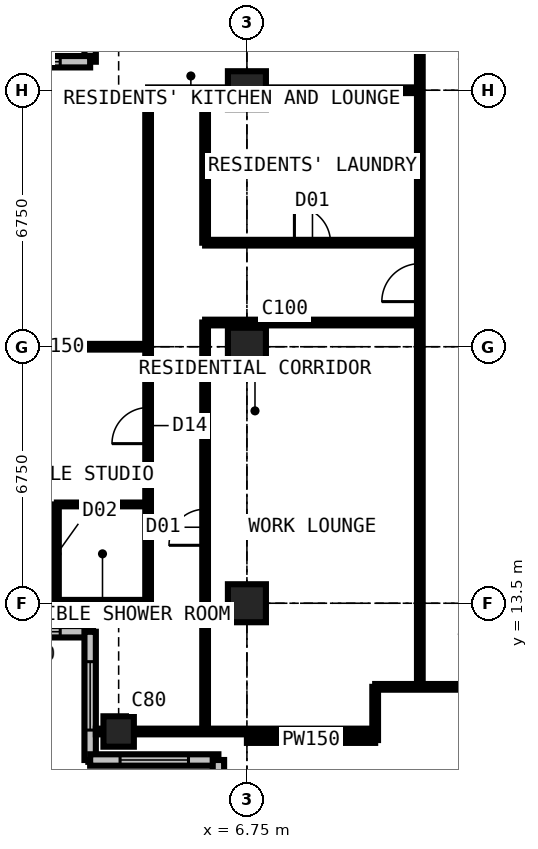
"""IFC4 building model, lengths in metres.
Left out: names, types, materials, properties, quantities, classifications, styles, units other than length and angle.
Written with IfcOpenShell. Run it as: python <this file> out.ifc"""

import sys

from ifc_helpers import new_model, si_unit, direction, frame, frame_2d, origin, origin_2d, place, context, subcontext, project, spatial, rectangle, extrude, element, fill, save


model = new_model("IFC4")
c1 = context("Model", 3, precision=1e-05, world=origin(), true_north=direction((0.0, 1.0)))
c2 = subcontext(c1, "Body", "Model", "MODEL_VIEW")
j1 = project(units=[si_unit("LENGTHUNIT", "METRE"), si_unit("PLANEANGLEUNIT", "RADIAN")], contexts=[c1])
p1 = place(None, origin())
s1 = spatial("IfcSite", under=j1, at=p1, CompositionType="ELEMENT")
p2 = place(p1, origin())
s2 = spatial("IfcBuilding", under=s1, at=p2, CompositionType="ELEMENT")
p3 = place(p2, frame((0.0, 0.0, 233.1)))
s3 = spatial("IfcBuildingStorey", under=s2, at=p3, CompositionType="ELEMENT", Elevation=233.1)
p4 = place(p3, frame((3.375, 10.125, 0.0), z_axis=(0.0, 0.0, 1.0), x_axis=(1.0, 0.0, 0.0)))
e1 = element("IfcColumn", 1, at=p4, inside=s3, PredefinedType="COLUMN", context=c2, shape_type="SweptSolid", body=[
    extrude(rectangle(XDim=0.8, YDim=0.8, at=origin_2d()), origin(), (0.0, 0.0, 1.0), 3.6),
])
for number, where, z_axis, x_axis in (
    (2, (6.75, 13.5, 0.0), (0.0, 0.0, 1.0), (1.0, 0.0, 0.0)),
    (3, (6.75, 20.25, 0.0), (0.0, 0.0, 1.0), (1.0, 0.0, 0.0)),
    (4, (6.75, 27.0, 0.0), (0.0, 0.0, 1.0), (1.0, 0.0, 0.0)),
):
    element("IfcColumn", number, at=place(p3, frame(where, z_axis=z_axis, x_axis=x_axis)), inside=s3, PredefinedType="COLUMN", context=c2, shape_type="SweptSolid", body=[
        extrude(rectangle(XDim=1.0, YDim=1.0, at=origin_2d()), origin(), (0.0, 0.0, 1.0), 3.6),
    ])
p5 = place(p3, frame((2.625, 31.125, 0.0), z_axis=(0.0, 0.0, 1.0), x_axis=(0.0, -1.0, 0.0)))
e5 = element("IfcWall", 5, at=p5, inside=s3, PredefinedType="SOLIDWALL", context=c2, shape_type="SweptSolid", body=[
    extrude(rectangle(XDim=3.375, YDim=0.3, at=frame_2d((1.688, 0.0))), origin(), (0.0, 0.0, 1.0), 3.375),
])
p6 = place(p5, frame((0.788, 0.0, 0.6)))
e6 = element("IfcOpeningElement", 6, at=p6, cuts=e5, PredefinedType="OPENING", context=c2, shape_type="SweptSolid", body=[
    extrude(rectangle(XDim=1.8, YDim=2.1, at=frame_2d((0.9, 1.05))), frame((0.0, 0.16, 0.0), z_axis=(0.0, -1.0, 0.0), x_axis=(1.0, 0.0, 0.0)), (0.0, 0.0, 1.0), 0.32),
])
p7 = place(p3, frame((2.625, 27.75, 0.0), z_axis=(0.0, 0.0, 1.0), x_axis=(-1.0, 0.0, 0.0)))
e7 = element("IfcWall", 7, at=p7, inside=s3, PredefinedType="SOLIDWALL", context=c2, shape_type="SweptSolid", body=[
    extrude(rectangle(XDim=3.375, YDim=0.3, at=frame_2d((1.688, 0.0))), origin(), (0.0, 0.0, 1.0), 3.375),
])
p8 = place(p7, frame((0.788, 0.0, 0.6)))
e8 = element("IfcOpeningElement", 8, at=p8, cuts=e7, PredefinedType="OPENING", context=c2, shape_type="SweptSolid", body=[
    extrude(rectangle(XDim=1.8, YDim=2.1, at=frame_2d((0.9, 1.05))), frame((0.0, 0.16, 0.0), z_axis=(0.0, -1.0, 0.0), x_axis=(1.0, 0.0, 0.0)), (0.0, 0.0, 1.0), 0.32),
])
p9 = place(p3, frame((-0.75, 12.75, 0.0), z_axis=(0.0, 0.0, 1.0), x_axis=(1.0, 0.0, 0.0)))
e9 = element("IfcWall", 9, at=p9, inside=s3, PredefinedType="SOLIDWALL", context=c2, shape_type="SweptSolid", body=[
    extrude(rectangle(XDim=3.375, YDim=0.3, at=frame_2d((1.688, 0.0))), origin(), (0.0, 0.0, 1.0), 3.375),
])
p10 = place(p9, frame((0.788, 0.0, 0.6)))
e10 = element("IfcOpeningElement", 10, at=p10, cuts=e9, PredefinedType="OPENING", context=c2, shape_type="SweptSolid", body=[
    extrude(rectangle(XDim=1.8, YDim=2.1, at=frame_2d((0.9, 1.05))), frame((0.0, 0.16, 0.0), z_axis=(0.0, -1.0, 0.0), x_axis=(1.0, 0.0, 0.0)), (0.0, 0.0, 1.0), 0.32),
])
p11 = place(p3, frame((2.625, 12.75, 0.0), z_axis=(0.0, 0.0, 1.0), x_axis=(0.0, -1.0, 0.0)))
e11 = element("IfcWall", 11, at=p11, inside=s3, PredefinedType="SOLIDWALL", context=c2, shape_type="SweptSolid", body=[
    extrude(rectangle(XDim=3.375, YDim=0.3, at=frame_2d((1.688, 0.0))), origin(), (0.0, 0.0, 1.0), 3.375),
])
p12 = place(p11, frame((0.788, 0.0, 0.6)))
e12 = element("IfcOpeningElement", 12, at=p12, cuts=e11, PredefinedType="OPENING", context=c2, shape_type="SweptSolid", body=[
    extrude(rectangle(XDim=1.8, YDim=2.1, at=frame_2d((0.9, 1.05))), frame((0.0, 0.16, 0.0), z_axis=(0.0, -1.0, 0.0), x_axis=(1.0, 0.0, 0.0)), (0.0, 0.0, 1.0), 0.32),
])
p13 = place(p3, frame((2.625, 9.375, 0.0), z_axis=(0.0, 0.0, 1.0), x_axis=(1.0, 0.0, 0.0)))
e13 = element("IfcWall", 13, at=p13, inside=s3, PredefinedType="SOLIDWALL", context=c2, shape_type="SweptSolid", body=[
    extrude(rectangle(XDim=3.375, YDim=0.3, at=frame_2d((1.688, 0.0))), origin(), (0.0, 0.0, 1.0), 3.375),
])
p14 = place(p13, frame((0.788, 0.0, 0.6)))
e14 = element("IfcOpeningElement", 14, at=p14, cuts=e13, PredefinedType="OPENING", context=c2, shape_type="SweptSolid", body=[
    extrude(rectangle(XDim=1.8, YDim=2.1, at=frame_2d((0.9, 1.05))), frame((0.0, 0.16, 0.0), z_axis=(0.0, -1.0, 0.0), x_axis=(1.0, 0.0, 0.0)), (0.0, 0.0, 1.0), 0.32),
])
p15 = place(p3, frame((6.0, 9.375, 0.0), z_axis=(0.0, 0.0, 1.0), x_axis=(0.0, -1.0, 0.0)))
e15 = element("IfcWall", 15, at=p15, inside=s3, PredefinedType="SOLIDWALL", context=c2, shape_type="SweptSolid", body=[
    extrude(rectangle(XDim=3.375, YDim=0.3, at=frame_2d((1.688, 0.0))), origin(), (0.0, 0.0, 1.0), 3.375),
])
p16 = place(p15, frame((0.788, 0.0, 0.6)))
e16 = element("IfcOpeningElement", 16, at=p16, cuts=e15, PredefinedType="OPENING", context=c2, shape_type="SweptSolid", body=[
    extrude(rectangle(XDim=1.8, YDim=2.1, at=frame_2d((0.9, 1.05))), frame((0.0, 0.16, 0.0), z_axis=(0.0, -1.0, 0.0), x_axis=(1.0, 0.0, 0.0)), (0.0, 0.0, 1.0), 0.32),
])
p17 = place(p3, frame((-0.734, 13.5, 0.0), z_axis=(0.0, 0.0, 1.0), x_axis=(1.0, 0.0, 0.0)))
e17 = element("IfcWall", 17, at=p17, inside=s3, PredefinedType="PARTITIONING", context=c2, shape_type="SweptSolid", body=[
    extrude(rectangle(XDim=4.884, YDim=0.175, at=frame_2d((2.442, 0.0))), origin(), (0.0, 0.0, 1.0), 2.877),
])
p18 = place(p3, frame((-0.734, 20.25, 0.0), z_axis=(0.0, 0.0, 1.0), x_axis=(1.0, 0.0, 0.0)))
e18 = element("IfcWall", 18, at=p18, inside=s3, PredefinedType="PARTITIONING", context=c2, shape_type="SweptSolid", body=[
    extrude(rectangle(XDim=4.884, YDim=0.15, at=frame_2d((2.442, 0.0))), origin(), (0.0, 0.0, 1.0), 2.877),
])
p19 = place(p3, frame((1.75, 13.5, 0.0), z_axis=(0.0, 0.0, 1.0), x_axis=(0.0, 1.0, 0.0)))
e19 = element("IfcWall", 19, at=p19, inside=s3, PredefinedType="PARTITIONING", context=c2, shape_type="SweptSolid", body=[
    extrude(rectangle(XDim=2.6, YDim=0.1, at=frame_2d((1.3, 0.0))), origin(), (0.0, 0.0, 1.0), 3.375),
])
p20 = place(p19, frame((0.85, 0.0, 0.0)))
e20 = element("IfcOpeningElement", 20, at=p20, cuts=e19, PredefinedType="OPENING", context=c2, shape_type="SweptSolid", body=[
    extrude(rectangle(XDim=0.9, YDim=2.2, at=frame_2d((0.45, 1.1))), frame((0.0, 0.06, 0.0), z_axis=(0.0, -1.0, 0.0), x_axis=(1.0, 0.0, 0.0)), (0.0, 0.0, 1.0), 0.12),
])
p21 = place(p3, frame((1.75, 16.1, 0.0), z_axis=(0.0, 0.0, 1.0), x_axis=(1.0, 0.0, 0.0)))
e21 = element("IfcWall", 21, at=p21, inside=s3, PredefinedType="PARTITIONING", context=c2, shape_type="SweptSolid", body=[
    extrude(rectangle(XDim=2.4, YDim=0.1, at=frame_2d((1.2, 0.0))), origin(), (0.0, 0.0, 1.0), 3.375),
])
p22 = place(p3, frame((2.625, 12.766, 0.0), z_axis=(0.0, 0.0, 1.0), x_axis=(0.0, 1.0, 0.0)))
e22 = element("IfcWall", 22, at=p22, inside=s3, PredefinedType="PARTITIONING", context=c2, shape_type="SweptSolid", body=[
    extrude(rectangle(XDim=0.734, YDim=0.15, at=frame_2d((0.367, 0.0))), origin(), (0.0, 0.0, 1.0), 3.375),
])
p23 = place(p3, frame((2.775, 10.125, 0.0), z_axis=(0.0, 0.0, 1.0), x_axis=(1.0, 0.0, 0.0)))
e23 = element("IfcWall", 23, at=p23, inside=s3, PredefinedType="PARTITIONING", context=c2, shape_type="SweptSolid", body=[
    extrude(rectangle(XDim=7.35, YDim=0.15, at=frame_2d((3.675, 0.0))), origin(), (0.0, 0.0, 1.0), 2.877),
])
p24 = place(p3, frame((4.15, 13.5, 0.0), z_axis=(0.0, 0.0, 1.0), x_axis=(0.0, 1.0, 0.0)))
e24 = element("IfcWall", 24, at=p24, inside=s3, PredefinedType="PARTITIONING", context=c2, shape_type="SweptSolid", body=[
    extrude(rectangle(XDim=13.5, YDim=0.15, at=frame_2d((6.75, 0.0))), origin(), (0.0, 0.0, 1.0), 3.375),
])
p25 = place(p24, frame((4.2, 0.0, 0.0)))
e25 = element("IfcOpeningElement", 25, at=p25, cuts=e24, PredefinedType="OPENING", context=c2, shape_type="SweptSolid", body=[
    extrude(rectangle(XDim=0.95, YDim=2.2, at=frame_2d((0.475, 1.1))), frame((0.0, 0.085, 0.0), z_axis=(0.0, -1.0, 0.0), x_axis=(1.0, 0.0, 0.0)), (0.0, 0.0, 1.0), 0.17),
])
p26 = place(p3, frame((4.15, 27.0, 0.0), z_axis=(0.0, 0.0, 1.0), x_axis=(1.0, 0.0, 0.0)))
e26 = element("IfcWall", 26, at=p26, inside=s3, PredefinedType="PARTITIONING", context=c2, shape_type="SweptSolid", body=[
    extrude(rectangle(XDim=7.15, YDim=0.15, at=frame_2d((3.575, 0.0))), origin(), (0.0, 0.0, 1.0), 2.877),
])
p27 = place(p3, frame((5.65, 10.125, 0.0), z_axis=(0.0, 0.0, 1.0), x_axis=(0.0, 1.0, 0.0)))
e27 = element("IfcWall", 27, at=p27, inside=s3, PredefinedType="PARTITIONING", context=c2, shape_type="SweptSolid", body=[
    extrude(rectangle(XDim=10.762, YDim=0.15, at=frame_2d((5.381, 0.0))), origin(), (0.0, 0.0, 1.0), 3.375),
])
p28 = place(p27, frame((4.9, 0.0, 0.0)))
e28 = element("IfcOpeningElement", 28, at=p28, cuts=e27, PredefinedType="OPENING", context=c2, shape_type="SweptSolid", body=[
    extrude(rectangle(XDim=0.95, YDim=2.2, at=frame_2d((0.475, 1.1))), frame((0.0, 0.085, 0.0), z_axis=(0.0, -1.0, 0.0), x_axis=(1.0, 0.0, 0.0)), (0.0, 0.0, 1.0), 0.17),
])
p29 = place(p3, frame((5.65, 20.887, 0.0), z_axis=(0.0, 0.0, 1.0), x_axis=(1.0, 0.0, 0.0)))
e29 = element("IfcWall", 29, at=p29, inside=s3, PredefinedType="PARTITIONING", context=c2, shape_type="SweptSolid", body=[
    extrude(rectangle(XDim=5.65, YDim=0.15, at=frame_2d((2.825, 0.0))), origin(), (0.0, 0.0, 1.0), 3.375),
])
p30 = place(p3, frame((5.65, 22.988, 0.0), z_axis=(0.0, 0.0, 1.0), x_axis=(0.0, 1.0, 0.0)))
e30 = element("IfcWall", 30, at=p30, inside=s3, PredefinedType="PARTITIONING", context=c2, shape_type="SweptSolid", body=[
    extrude(rectangle(XDim=4.012, YDim=0.15, at=frame_2d((2.006, 0.0))), origin(), (0.0, 0.0, 1.0), 3.375),
])
p31 = place(p3, frame((5.65, 22.988, 0.0), z_axis=(0.0, 0.0, 1.0), x_axis=(1.0, 0.0, 0.0)))
e31 = element("IfcWall", 31, at=p31, inside=s3, PredefinedType="PARTITIONING", context=c2, shape_type="SweptSolid", body=[
    extrude(rectangle(XDim=5.65, YDim=0.15, at=frame_2d((2.825, 0.0))), origin(), (0.0, 0.0, 1.0), 3.375),
])
p32 = place(p31, frame((2.35, 0.0, 0.0)))
e32 = element("IfcOpeningElement", 32, at=p32, cuts=e31, PredefinedType="OPENING", context=c2, shape_type="SweptSolid", body=[
    extrude(rectangle(XDim=0.95, YDim=2.2, at=frame_2d((0.475, 1.1))), frame((0.0, 0.085, 0.0), z_axis=(0.0, -1.0, 0.0), x_axis=(1.0, 0.0, 0.0)), (0.0, 0.0, 1.0), 0.17),
])
p33 = place(p3, frame((6.75, 9.9, 0.0), z_axis=(0.0, 0.0, 1.0), x_axis=(1.0, 0.0, 0.0)))
e33 = element("IfcWall", 33, at=p33, inside=s3, PredefinedType="PARTITIONING", context=c2, shape_type="SweptSolid", body=[
    extrude(rectangle(XDim=3.375, YDim=0.15, at=frame_2d((1.688, 0.0))), origin(), (0.0, 0.0, 1.0), 3.375),
])
p34 = place(p3, frame((10.125, 9.9, 0.0), z_axis=(0.0, 0.0, 1.0), x_axis=(0.0, 1.0, 0.0)))
e34 = element("IfcWall", 34, at=p34, inside=s3, PredefinedType="PARTITIONING", context=c2, shape_type="SweptSolid", body=[
    extrude(rectangle(XDim=1.4, YDim=0.15, at=frame_2d((0.7, 0.0))), origin(), (0.0, 0.0, 1.0), 3.375),
])
p35 = place(p3, frame((10.125, 11.3, 0.0), z_axis=(0.0, 0.0, 1.0), x_axis=(1.0, 0.0, 0.0)))
e35 = element("IfcWall", 35, at=p35, inside=s3, PredefinedType="PARTITIONING", context=c2, shape_type="SweptSolid", body=[
    extrude(rectangle(XDim=3.375, YDim=0.15, at=frame_2d((1.688, 0.0))), origin(), (0.0, 0.0, 1.0), 3.375),
])
p36 = place(p3, frame((11.3, 11.3, 0.0), z_axis=(0.0, 0.0, 1.0), x_axis=(0.0, 1.0, 0.0)))
e36 = element("IfcWall", 36, at=p36, inside=s3, PredefinedType="PARTITIONING", context=c2, shape_type="SweptSolid", body=[
    extrude(rectangle(XDim=19.3, YDim=0.15, at=frame_2d((9.65, 0.0))), origin(), (0.0, 0.0, 1.0), 3.375),
])
p37 = place(p36, frame((18.1, 0.0, 0.0)))
e37 = element("IfcOpeningElement", 37, at=p37, cuts=e36, PredefinedType="OPENING", context=c2, shape_type="SweptSolid", body=[
    extrude(rectangle(XDim=1.0, YDim=2.2, at=frame_2d((0.5, 1.1))), frame((0.0, 0.085, 0.0), z_axis=(0.0, -1.0, 0.0), x_axis=(1.0, 0.0, 0.0)), (0.0, 0.0, 1.0), 0.17),
])
p38 = place(p36, frame((10.137, 0.0, 0.0)))
e38 = element("IfcOpeningElement", 38, at=p38, cuts=e36, PredefinedType="OPENING", context=c2, shape_type="SweptSolid", body=[
    extrude(rectangle(XDim=1.0, YDim=2.2, at=frame_2d((0.5, 1.1))), frame((0.0, 0.085, 0.0), z_axis=(0.0, -1.0, 0.0), x_axis=(1.0, 0.0, 0.0)), (0.0, 0.0, 1.0), 0.17),
])
p39 = place(p8, origin())
e39 = element("IfcWindow", 39, at=p39, inside=s3, PartitioningType="SINGLE_PANEL", PredefinedType="WINDOW", context=c2, shape_type="SweptSolid", body=[
    extrude(rectangle(XDim=1.8, YDim=2.1, at=frame_2d((0.9, 1.05))), frame((0.0, 0.03, 0.0), z_axis=(0.0, -1.0, 0.0), x_axis=(1.0, 0.0, 0.0)), (0.0, 0.0, 1.0), 0.06),
])
fill(e8, e39)
p40 = place(p10, origin())
e40 = element("IfcWindow", 40, at=p40, inside=s3, PartitioningType="SINGLE_PANEL", PredefinedType="WINDOW", context=c2, shape_type="SweptSolid", body=[
    extrude(rectangle(XDim=1.8, YDim=2.1, at=frame_2d((0.9, 1.05))), frame((0.0, 0.03, 0.0), z_axis=(0.0, -1.0, 0.0), x_axis=(1.0, 0.0, 0.0)), (0.0, 0.0, 1.0), 0.06),
])
fill(e10, e40)
p41 = place(p12, origin())
e41 = element("IfcWindow", 41, at=p41, inside=s3, PartitioningType="SINGLE_PANEL", PredefinedType="WINDOW", context=c2, shape_type="SweptSolid", body=[
    extrude(rectangle(XDim=1.8, YDim=2.1, at=frame_2d((0.9, 1.05))), frame((0.0, 0.03, 0.0), z_axis=(0.0, -1.0, 0.0), x_axis=(1.0, 0.0, 0.0)), (0.0, 0.0, 1.0), 0.06),
])
fill(e12, e41)
p42 = place(p14, origin())
e42 = element("IfcWindow", 42, at=p42, inside=s3, PartitioningType="SINGLE_PANEL", PredefinedType="WINDOW", context=c2, shape_type="SweptSolid", body=[
    extrude(rectangle(XDim=1.8, YDim=2.1, at=frame_2d((0.9, 1.05))), frame((0.0, 0.03, 0.0), z_axis=(0.0, -1.0, 0.0), x_axis=(1.0, 0.0, 0.0)), (0.0, 0.0, 1.0), 0.06),
])
fill(e14, e42)
p43 = place(p25, origin())
e43 = element("IfcDoor", 43, at=p43, inside=s3, OperationType="SINGLE_SWING_LEFT", PredefinedType="DOOR", context=c2, shape_type="SweptSolid", body=[
    extrude(rectangle(XDim=0.95, YDim=2.2, at=frame_2d((0.475, 1.1))), frame((0.0, 0.025, 0.0), z_axis=(0.0, -1.0, 0.0), x_axis=(1.0, 0.0, 0.0)), (0.0, 0.0, 1.0), 0.05),
])
fill(e25, e43)
p44 = place(p20, origin())
e44 = element("IfcDoor", 44, at=p44, inside=s3, OperationType="SINGLE_SWING_RIGHT", PredefinedType="DOOR", context=c2, shape_type="SweptSolid", body=[
    extrude(rectangle(XDim=0.9, YDim=2.2, at=frame_2d((0.45, 1.1))), frame((0.0, 0.025, 0.0), z_axis=(0.0, -1.0, 0.0), x_axis=(1.0, 0.0, 0.0)), (0.0, 0.0, 1.0), 0.05),
])
fill(e20, e44)
p45 = place(p38, origin())
e45 = element("IfcDoor", 45, at=p45, inside=s3, OperationType="SINGLE_SWING_LEFT", PredefinedType="DOOR", context=c2, shape_type="SweptSolid", body=[
    extrude(rectangle(XDim=1.0, YDim=2.2, at=frame_2d((0.5, 1.1))), frame((0.0, 0.025, 0.0), z_axis=(0.0, -1.0, 0.0), x_axis=(1.0, 0.0, 0.0)), (0.0, 0.0, 1.0), 0.05),
])
fill(e38, e45)
p46 = place(p32, origin())
e46 = element("IfcDoor", 46, at=p46, inside=s3, OperationType="SINGLE_SWING_LEFT", PredefinedType="DOOR", context=c2, shape_type="SweptSolid", body=[
    extrude(rectangle(XDim=0.95, YDim=2.2, at=frame_2d((0.475, 1.1))), frame((0.0, 0.025, 0.0), z_axis=(0.0, -1.0, 0.0), x_axis=(1.0, 0.0, 0.0)), (0.0, 0.0, 1.0), 0.05),
])
fill(e32, e46)
p47 = place(p28, origin())
e47 = element("IfcDoor", 47, at=p47, inside=s3, OperationType="SINGLE_SWING_LEFT", PredefinedType="DOOR", context=c2, shape_type="SweptSolid", body=[
    extrude(rectangle(XDim=0.95, YDim=2.2, at=frame_2d((0.475, 1.1))), frame((0.0, 0.025, 0.0), z_axis=(0.0, -1.0, 0.0), x_axis=(1.0, 0.0, 0.0)), (0.0, 0.0, 1.0), 0.05),
])
fill(e28, e47)
save(model, sys.argv[1])
